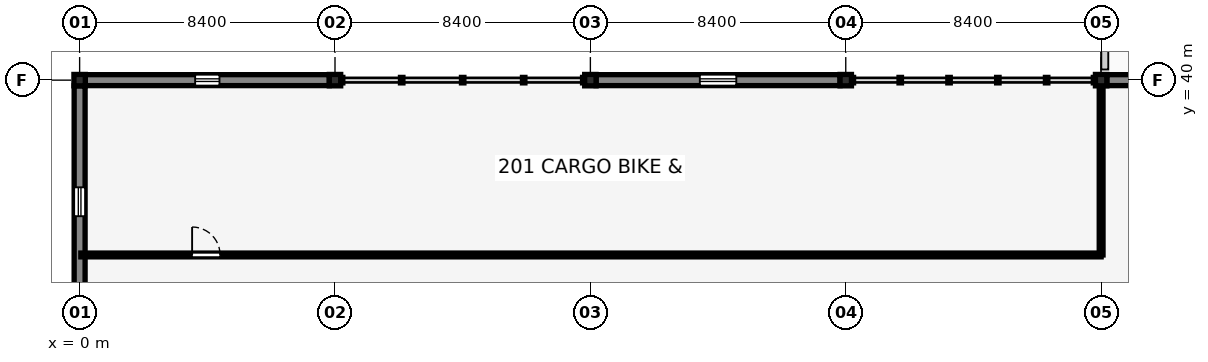
"""IFC4 building model, lengths in metres.
Left out: names, types, materials, properties, quantities, classifications, styles, units other than length and angle.
Written with IfcOpenShell. Run it as: python <this file> out.ifc"""

import sys

from ifc_helpers import new_model, si_unit, direction, frame, frame_2d, origin, origin_2d, place, context, subcontext, project, spatial, rectangle, i_section, extrude, element, fill, save


model = new_model("IFC4")
c1 = context("Model", 3, precision=1e-05, world=origin(), true_north=direction((0.0, 1.0)))
c2 = subcontext(c1, "Body", "Model", "MODEL_VIEW")
j1 = project(units=[si_unit("LENGTHUNIT", "METRE"), si_unit("PLANEANGLEUNIT", "RADIAN")], contexts=[c1])
p1 = place(None, origin())
s1 = spatial("IfcSite", under=j1, at=p1, CompositionType="ELEMENT")
p2 = place(p1, origin())
s2 = spatial("IfcBuilding", under=s1, at=p2, CompositionType="ELEMENT")
p3 = place(p2, frame((0.0, 0.0, 9.52)))
s3 = spatial("IfcBuildingStorey", under=s2, at=p3, CompositionType="ELEMENT", Elevation=9.52)
for number, where, z_axis, x_axis in (
    (1, (0.0, 40.0, 0.0), (0.0, 0.0, 1.0), (1.0, 0.0, 0.0)),
    (2, (8.4, 40.0, 0.0), (0.0, 0.0, 1.0), (1.0, 0.0, 0.0)),
    (3, (16.8, 40.0, 0.0), (0.0, 0.0, 1.0), (1.0, 0.0, 0.0)),
    (4, (25.2, 40.0, 0.0), (0.0, 0.0, 1.0), (1.0, 0.0, 0.0)),
    (5, (33.6, 40.0, 0.0), (0.0, 0.0, 1.0), (1.0, 0.0, 0.0)),
):
    element("IfcColumn", number, at=place(p3, frame(where, z_axis=z_axis, x_axis=x_axis)), inside=s3, PredefinedType="COLUMN", context=c2, shape_type="SweptSolid", body=[
        extrude(i_section(OverallWidth=0.375, OverallDepth=0.375, WebThickness=0.017, FlangeThickness=0.027, FilletRadius=0.015, at=origin_2d()), origin(), (0.0, 0.0, 1.0), 6.275),
    ])
p4 = place(p3, frame((0.0, 32.187, 0.0), z_axis=(0.0, 0.0, 1.0), x_axis=(0.0, 1.0, 0.0)))
e6 = element("IfcWall", 6, at=p4, inside=s3, PredefinedType="SOLIDWALL", context=c2, shape_type="SweptSolid", body=[
    extrude(rectangle(XDim=7.625, YDim=0.36, at=frame_2d((3.813, 0.0))), origin(), (0.0, 0.0, 1.0), 3.57),
])
p5 = place(p4, frame((3.338, 0.0, 0.65), z_axis=(0.0, 0.0, 1.0), x_axis=(1.0, 0.0, 0.0)))
e7 = element("IfcOpeningElement", 7, at=p5, cuts=e6, PredefinedType="OPENING", context=c2, shape_type="SweptSolid", body=[
    extrude(rectangle(XDim=0.95, YDim=2.1, at=frame_2d((0.475, 1.05))), frame((0.0, 0.19, 0.0), z_axis=(0.0, -1.0, 0.0), x_axis=(1.0, 0.0, 0.0)), (0.0, 0.0, 1.0), 0.38),
])
p6 = place(p3, frame((0.187, 40.0, 0.0), z_axis=(0.0, 0.0, 1.0), x_axis=(1.0, 0.0, 0.0)))
e8 = element("IfcWall", 8, at=p6, inside=s3, PredefinedType="SOLIDWALL", context=c2, shape_type="SweptSolid", body=[
    extrude(rectangle(XDim=8.025, YDim=0.36, at=frame_2d((4.013, 0.0))), origin(), (0.0, 0.0, 1.0), 3.57),
])
p7 = place(p6, frame((3.613, 0.0, 0.65), z_axis=(0.0, 0.0, 1.0), x_axis=(1.0, 0.0, 0.0)))
e9 = element("IfcOpeningElement", 9, at=p7, cuts=e8, PredefinedType="OPENING", context=c2, shape_type="SweptSolid", body=[
    extrude(rectangle(XDim=0.8, YDim=1.85, at=frame_2d((0.4, 0.925))), frame((0.0, 0.19, 0.0), z_axis=(0.0, -1.0, 0.0), x_axis=(1.0, 0.0, 0.0)), (0.0, 0.0, 1.0), 0.38),
])
p8 = place(p3, frame((16.987, 40.0, 0.0), z_axis=(0.0, 0.0, 1.0), x_axis=(1.0, 0.0, 0.0)))
e10 = element("IfcWall", 10, at=p8, inside=s3, PredefinedType="SOLIDWALL", context=c2, shape_type="SweptSolid", body=[
    extrude(rectangle(XDim=8.025, YDim=0.36, at=frame_2d((4.013, 0.0))), origin(), (0.0, 0.0, 1.0), 3.57),
])
p9 = place(p8, frame((3.413, 0.0, 1.55), z_axis=(0.0, 0.0, 1.0), x_axis=(1.0, 0.0, 0.0)))
e11 = element("IfcOpeningElement", 11, at=p9, cuts=e10, PredefinedType="OPENING", context=c2, shape_type="SweptSolid", body=[
    extrude(rectangle(XDim=1.2, YDim=0.95, at=frame_2d((0.6, 0.475))), frame((0.0, 0.19, 0.0), z_axis=(0.0, -1.0, 0.0), x_axis=(1.0, 0.0, 0.0)), (0.0, 0.0, 1.0), 0.38),
])
p10 = place(p3, frame((33.787, 40.0, 0.0), z_axis=(0.0, 0.0, 1.0), x_axis=(1.0, 0.0, 0.0)))
e12 = element("IfcWall", 12, at=p10, inside=s3, PredefinedType="SOLIDWALL", context=c2, shape_type="SweptSolid", body=[
    extrude(rectangle(XDim=8.025, YDim=0.36, at=frame_2d((4.013, 0.0))), origin(), (0.0, 0.0, 1.0), 3.57),
])
p11 = place(p10, frame((3.213, 0.0, 0.9), z_axis=(0.0, 0.0, 1.0), x_axis=(1.0, 0.0, 0.0)))
e13 = element("IfcOpeningElement", 13, at=p11, cuts=e12, PredefinedType="OPENING", context=c2, shape_type="SweptSolid", body=[
    extrude(rectangle(XDim=1.6, YDim=1.2, at=frame_2d((0.8, 0.6))), frame((0.0, 0.19, 0.0), z_axis=(0.0, -1.0, 0.0), x_axis=(1.0, 0.0, 0.0)), (0.0, 0.0, 1.0), 0.38),
])
p12 = place(p3, frame((33.72, 40.35, 0.0), z_axis=(0.0, 0.0, 1.0), x_axis=(0.0, 1.0, 0.0)))
e14 = element("IfcWall", 14, at=p12, inside=s3, PredefinedType="PARAPET", context=c2, shape_type="SweptSolid", body=[
    extrude(rectangle(XDim=7.322, YDim=0.23, at=frame_2d((3.661, 0.0))), origin(), (0.0, 0.0, 1.0), 1.05),
])
p13 = place(p3, frame((0.04, 34.25, 0.0), z_axis=(0.0, 0.0, 1.0), x_axis=(1.0, 0.0, 0.0)))
e15 = element("IfcWall", 15, at=p13, inside=s3, PredefinedType="PARTITIONING", context=c2, shape_type="SweptSolid", body=[
    extrude(rectangle(XDim=33.56, YDim=0.125, at=frame_2d((16.78, 0.0))), origin(), (0.0, 0.0, 1.0), 3.57),
])
p14 = place(p13, frame((3.66, 0.0, 0.0), z_axis=(0.0, 0.0, 1.0), x_axis=(1.0, 0.0, 0.0)))
e16 = element("IfcOpeningElement", 16, at=p14, cuts=e15, PredefinedType="OPENING", context=c2, shape_type="SweptSolid", body=[
    extrude(rectangle(XDim=0.92, YDim=2.12, at=frame_2d((0.46, 1.06))), frame((0.0, 0.073, 0.0), z_axis=(0.0, -1.0, 0.0), x_axis=(1.0, 0.0, 0.0)), (0.0, 0.0, 1.0), 0.145),
])
p15 = place(p3, frame((33.6, 34.25, 0.0), z_axis=(0.0, 0.0, 1.0), x_axis=(0.0, 1.0, 0.0)))
e17 = element("IfcWall", 17, at=p15, inside=s3, PredefinedType="PARTITIONING", context=c2, shape_type="SweptSolid", body=[
    extrude(rectangle(XDim=5.573, YDim=0.125, at=frame_2d((2.786, 0.0))), origin(), (0.0, 0.0, 1.0), 3.57),
])
p16 = place(p5, origin())
e18 = element("IfcWindow", 18, at=p16, inside=s3, PartitioningType="SINGLE_PANEL", PredefinedType="WINDOW", context=c2, shape_type="SweptSolid", body=[
    extrude(rectangle(XDim=0.95, YDim=2.1, at=frame_2d((0.475, 1.05))), frame((0.0, 0.03, 0.0), z_axis=(0.0, -1.0, 0.0), x_axis=(1.0, 0.0, 0.0)), (0.0, 0.0, 1.0), 0.06),
])
fill(e7, e18)
p17 = place(p7, origin())
e19 = element("IfcWindow", 19, at=p17, inside=s3, PartitioningType="SINGLE_PANEL", PredefinedType="WINDOW", context=c2, shape_type="SweptSolid", body=[
    extrude(rectangle(XDim=0.8, YDim=1.85, at=frame_2d((0.4, 0.925))), frame((0.0, 0.03, 0.0), z_axis=(0.0, -1.0, 0.0), x_axis=(1.0, 0.0, 0.0)), (0.0, 0.0, 1.0), 0.06),
])
fill(e9, e19)
p18 = place(p9, origin())
e20 = element("IfcWindow", 20, at=p18, inside=s3, PartitioningType="SINGLE_PANEL", PredefinedType="WINDOW", context=c2, shape_type="SweptSolid", body=[
    extrude(rectangle(XDim=1.2, YDim=0.95, at=frame_2d((0.6, 0.475))), frame((0.0, 0.03, 0.0), z_axis=(0.0, -1.0, 0.0), x_axis=(1.0, 0.0, 0.0)), (0.0, 0.0, 1.0), 0.06),
])
fill(e11, e20)
p19 = place(p14, origin())
e21 = element("IfcDoor", 21, at=p19, inside=s3, OperationType="SINGLE_SWING_LEFT", PredefinedType="DOOR", context=c2, shape_type="SweptSolid", body=[
    extrude(rectangle(XDim=0.92, YDim=2.12, at=frame_2d((0.46, 1.06))), frame((0.0, 0.025, 0.0), z_axis=(0.0, -1.0, 0.0), x_axis=(1.0, 0.0, 0.0)), (0.0, 0.0, 1.0), 0.05),
])
fill(e16, e21)
save(model, sys.argv[1])
